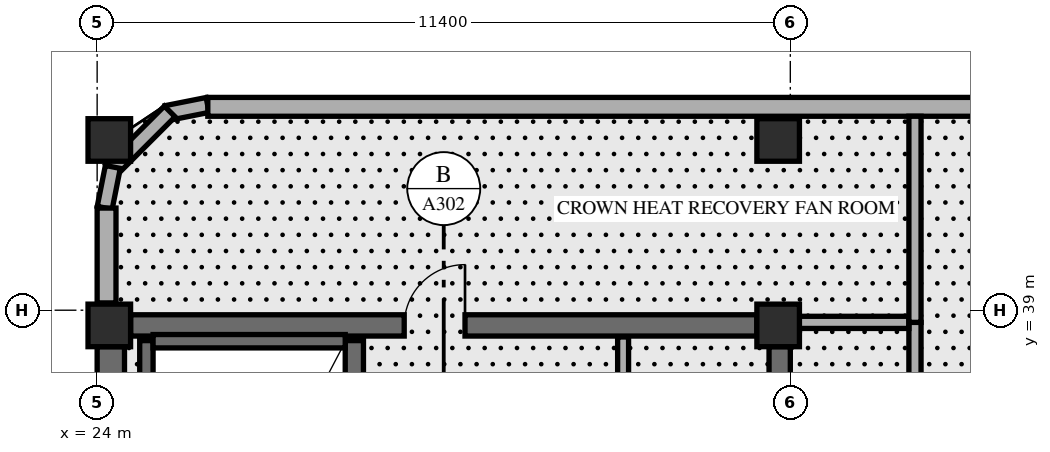
"""IFC4 building model, lengths in metres.
Left out: names, types, materials, properties, quantities, classifications, styles, units other than length and angle.
Written with IfcOpenShell. Run it as: python <this file> out.ifc"""

import sys

from ifc_helpers import new_model, si_unit, direction, frame, frame_2d, origin, origin_2d, place, context, subcontext, project, spatial, rectangle, extrude, element, fill, save


model = new_model("IFC4")
c1 = context("Model", 3, precision=1e-05, world=origin(), true_north=direction((0.0, 1.0)))
c2 = subcontext(c1, "Body", "Model", "MODEL_VIEW")
j1 = project(units=[si_unit("LENGTHUNIT", "METRE"), si_unit("PLANEANGLEUNIT", "RADIAN")], contexts=[c1])
p1 = place(None, origin())
s1 = spatial("IfcSite", under=j1, at=p1, CompositionType="ELEMENT")
p2 = place(p1, origin())
s2 = spatial("IfcBuilding", under=s1, at=p2, CompositionType="ELEMENT")
p3 = place(p2, frame((0.0, 0.0, 287.0)))
s3 = spatial("IfcBuildingStorey", under=s2, at=p3, CompositionType="ELEMENT", Elevation=287.0)
p4 = place(p3, frame((24.225, 30.55, 0.0), z_axis=(0.0, 0.0, 1.0), x_axis=(0.0, 1.0, 0.0)))
e1 = element("IfcWall", 1, at=p4, inside=s3, PredefinedType="SHEAR", context=c2, shape_type="SweptSolid", body=[
    extrude(rectangle(XDim=7.85, YDim=0.45, at=frame_2d((3.925, 0.0))), origin(), (0.0, 0.0, 1.0), 5.161),
])
p5 = place(p3, frame((35.225, 31.35, 0.0), z_axis=(0.0, 0.0, 1.0), x_axis=(0.0, 1.0, 0.0)))
e2 = element("IfcWall", 2, at=p5, inside=s3, PredefinedType="SHEAR", context=c2, shape_type="SweptSolid", body=[
    extrude(rectangle(XDim=7.05, YDim=0.35, at=frame_2d((3.525, 0.0))), origin(), (0.0, 0.0, 1.0), 5.161),
])
p6 = place(p3, frame((24.55, 38.75, 0.0), z_axis=(0.0, 0.0, 1.0), x_axis=(1.0, 0.0, 0.0)))
e3 = element("IfcWall", 3, at=p6, inside=s3, PredefinedType="SHEAR", context=c2, shape_type="SweptSolid", body=[
    extrude(rectangle(XDim=10.3, YDim=0.35, at=frame_2d((5.15, 0.0))), origin(), (0.0, 0.0, 1.0), 5.7),
])
p7 = place(p6, frame((4.5, 0.0, 0.0)))
e4 = element("IfcOpeningElement", 4, at=p7, cuts=e3, PredefinedType="OPENING", context=c2, shape_type="SweptSolid", body=[
    extrude(rectangle(XDim=1.0, YDim=2.15, at=frame_2d((0.5, 1.075))), frame((0.0, 0.185, 0.0), z_axis=(0.0, -1.0, 0.0), x_axis=(1.0, 0.0, 0.0)), (0.0, 0.0, 1.0), 0.37),
])
p8 = place(p3, frame((24.81, 30.74, 0.0), z_axis=(0.0, 0.0, 1.0), x_axis=(0.0, 1.0, 0.0)))
e5 = element("IfcWall", 5, at=p8, inside=s3, PredefinedType="SHEAR", context=c2, shape_type="SweptSolid", body=[
    extrude(rectangle(XDim=7.76, YDim=0.22, at=frame_2d((3.88, 0.0))), origin(), (0.0, 0.0, 1.0), 5.7),
])
p9 = place(p3, frame((28.23, 30.74, 0.0), z_axis=(0.0, 0.0, 1.0), x_axis=(0.0, 1.0, 0.0)))
e6 = element("IfcWall", 6, at=p9, inside=s3, PredefinedType="SHEAR", context=c2, shape_type="SweptSolid", body=[
    extrude(rectangle(XDim=7.76, YDim=0.3, at=frame_2d((3.88, 0.0))), origin(), (0.0, 0.0, 1.0), 5.7),
])
p10 = place(p3, frame((24.92, 38.49, 0.0), z_axis=(0.0, 0.0, 1.0), x_axis=(1.0, 0.0, 0.0)))
e7 = element("IfcWall", 7, at=p10, inside=s3, PredefinedType="SHEAR", context=c2, shape_type="SweptSolid", body=[
    extrude(rectangle(XDim=3.16, YDim=0.22, at=frame_2d((1.58, 0.0))), origin(), (0.0, 0.0, 1.0), 5.7),
])
for number, where, z_axis, x_axis in (
    (8, (24.2, 38.75, 0.0), (0.0, 0.0, 1.0), (1.0, 0.0, 0.0)),
    (9, (24.2, 41.8, 0.0), (0.0, 0.0, 1.0), (1.0, 0.0, 0.0)),
    (10, (35.2, 38.75, 0.0), (0.0, 0.0, 1.0), (1.0, 0.0, 0.0)),
    (11, (35.2, 41.8, 0.0), (0.0, 0.0, 1.0), (1.0, 0.0, 0.0)),
):
    element("IfcColumn", number, at=place(p3, frame(where, z_axis=z_axis, x_axis=x_axis)), inside=s3, PredefinedType="COLUMN", context=c2, shape_type="SweptSolid", body=[
        extrude(rectangle(XDim=0.7, YDim=0.7, at=origin_2d()), origin(), (0.0, 0.0, 1.0), 5.996),
    ])
p11 = place(p3, frame((25.816, 42.376, 0.0), z_axis=(0.0, 0.0, 1.0), x_axis=(-0.980812594069, -0.194952956674, 0.0)))
e12 = element("IfcWall", 12, at=p11, inside=s3, PredefinedType="SOLIDWALL", context=c2, shape_type="SweptSolid", body=[
    extrude(rectangle(XDim=0.686, YDim=0.25, at=frame_2d((0.343, 0.0))), origin(), (0.0, 0.0, 1.0), 5.7),
])
p12 = place(p3, frame((25.194, 42.269, 0.0), z_axis=(0.0, 0.0, 1.0), x_axis=(-0.707106781187, -0.707106781187, 0.0)))
e13 = element("IfcWall", 13, at=p12, inside=s3, PredefinedType="SOLIDWALL", context=c2, shape_type="SweptSolid", body=[
    extrude(rectangle(XDim=1.362, YDim=0.25, at=frame_2d((0.681, 0.0))), origin(), (0.0, 0.0, 1.0), 5.143),
])
p13 = place(p3, frame((24.258, 41.357, 0.0), z_axis=(0.0, 0.0, 1.0), x_axis=(-0.194952956674, -0.980812594069, 0.0)))
e14 = element("IfcWall", 14, at=p13, inside=s3, PredefinedType="SOLIDWALL", context=c2, shape_type="SweptSolid", body=[
    extrude(rectangle(XDim=0.686, YDim=0.25, at=frame_2d((0.343, 0.0))), origin(), (0.0, 0.0, 1.0), 5.143),
])
p14 = place(p3, frame((58.78, 42.345, 0.0), z_axis=(0.0, 0.0, 1.0), x_axis=(-1.0, 0.0, 0.0)))
e15 = element("IfcWall", 15, at=p14, inside=s3, PredefinedType="SOLIDWALL", context=c2, shape_type="SweptSolid", body=[
    extrude(rectangle(XDim=32.96, YDim=0.31, at=frame_2d((16.48, 0.0))), origin(), (0.0, 0.0, 1.0), 5.7),
])
p15 = place(p3, frame((24.155, 39.12, 0.0), z_axis=(0.0, 0.0, 1.0), x_axis=(0.0, 1.0, 0.0)))
e16 = element("IfcWall", 16, at=p15, inside=s3, PredefinedType="SOLIDWALL", context=c2, shape_type="SweptSolid", body=[
    extrude(rectangle(XDim=1.56, YDim=0.31, at=frame_2d((0.78, 0.0))), origin(), (0.0, 0.0, 1.0), 5.143),
])
p16 = place(p3, frame((32.65, 31.35, 0.0), z_axis=(0.0, 0.0, 1.0), x_axis=(0.0, 1.0, 0.0)))
e17 = element("IfcWall", 17, at=p16, inside=s3, PredefinedType="STANDARD", context=c2, shape_type="SweptSolid", body=[
    extrude(rectangle(XDim=7.21, YDim=0.18, at=frame_2d((3.605, 0.0))), origin(), (0.0, 0.0, 1.0), 5.7),
])
p17 = place(p16, frame((0.58, 0.0, 0.0)))
e18 = element("IfcOpeningElement", 18, at=p17, cuts=e17, PredefinedType="OPENING", context=c2, shape_type="SweptSolid", body=[
    extrude(rectangle(XDim=0.9, YDim=2.1, at=frame_2d((0.45, 1.05))), frame((0.0, 0.1, 0.0), z_axis=(0.0, -1.0, 0.0), x_axis=(1.0, 0.0, 0.0)), (0.0, 0.0, 1.0), 0.2),
])
p18 = place(p16, frame((2.73, 0.0, 0.0)))
e19 = element("IfcOpeningElement", 19, at=p18, cuts=e17, PredefinedType="OPENING", context=c2, shape_type="SweptSolid", body=[
    extrude(rectangle(XDim=0.9, YDim=2.1, at=frame_2d((0.45, 1.05))), frame((0.0, 0.1, 0.0), z_axis=(0.0, -1.0, 0.0), x_axis=(1.0, 0.0, 0.0)), (0.0, 0.0, 1.0), 0.2),
])
p19 = place(p16, frame((4.88, 0.0, 0.0)))
e20 = element("IfcOpeningElement", 20, at=p19, cuts=e17, PredefinedType="OPENING", context=c2, shape_type="SweptSolid", body=[
    extrude(rectangle(XDim=0.9, YDim=2.1, at=frame_2d((0.45, 1.05))), frame((0.0, 0.1, 0.0), z_axis=(0.0, -1.0, 0.0), x_axis=(1.0, 0.0, 0.0)), (0.0, 0.0, 1.0), 0.2),
])
p20 = place(p3, frame((37.45, 13.8, 0.0), z_axis=(0.0, 0.0, 1.0), x_axis=(0.0, 1.0, 0.0)))
e21 = element("IfcWall", 21, at=p20, inside=s3, PredefinedType="STANDARD", context=c2, shape_type="SweptSolid", body=[
    extrude(rectangle(XDim=25.0, YDim=0.2, at=frame_2d((12.5, 0.0))), origin(), (0.0, 0.0, 1.0), 5.143),
])
p21 = place(p20, frame((6.6, 0.0, 0.0)))
e22 = element("IfcOpeningElement", 22, at=p21, cuts=e21, PredefinedType="OPENING", context=c2, shape_type="SweptSolid", body=[
    extrude(rectangle(XDim=1.05, YDim=2.15, at=frame_2d((0.525, 1.075))), frame((0.0, 0.11, 0.0), z_axis=(0.0, -1.0, 0.0), x_axis=(1.0, 0.0, 0.0)), (0.0, 0.0, 1.0), 0.22),
])
p22 = place(p20, frame((0.6, 0.0, 0.0)))
e23 = element("IfcOpeningElement", 23, at=p22, cuts=e21, PredefinedType="OPENING", context=c2, shape_type="SweptSolid", body=[
    extrude(rectangle(XDim=1.0, YDim=2.15, at=frame_2d((0.5, 1.075))), frame((0.0, 0.11, 0.0), z_axis=(0.0, -1.0, 0.0), x_axis=(1.0, 0.0, 0.0)), (0.0, 0.0, 1.0), 0.22),
])
p23 = place(p20, frame((11.6, 0.0, 0.0)))
e24 = element("IfcOpeningElement", 24, at=p23, cuts=e21, PredefinedType="OPENING", context=c2, shape_type="SweptSolid", body=[
    extrude(rectangle(XDim=1.05, YDim=2.15, at=frame_2d((0.525, 1.075))), frame((0.0, 0.11, 0.0), z_axis=(0.0, -1.0, 0.0), x_axis=(1.0, 0.0, 0.0)), (0.0, 0.0, 1.0), 0.22),
])
p24 = place(p20, frame((18.1, 0.0, 0.0)))
e25 = element("IfcOpeningElement", 25, at=p24, cuts=e21, PredefinedType="OPENING", context=c2, shape_type="SweptSolid", body=[
    extrude(rectangle(XDim=1.05, YDim=2.15, at=frame_2d((0.525, 1.075))), frame((0.0, 0.11, 0.0), z_axis=(0.0, -1.0, 0.0), x_axis=(1.0, 0.0, 0.0)), (0.0, 0.0, 1.0), 0.22),
])
p25 = place(p20, frame((22.0, 0.0, 0.0)))
e26 = element("IfcOpeningElement", 26, at=p25, cuts=e21, PredefinedType="OPENING", context=c2, shape_type="SweptSolid", body=[
    extrude(rectangle(XDim=1.05, YDim=2.15, at=frame_2d((0.525, 1.075))), frame((0.0, 0.11, 0.0), z_axis=(0.0, -1.0, 0.0), x_axis=(1.0, 0.0, 0.0)), (0.0, 0.0, 1.0), 0.22),
])
p26 = place(p3, frame((35.42, 38.8, 0.0), z_axis=(0.0, 0.0, 1.0), x_axis=(1.0, 0.0, 0.0)))
e27 = element("IfcWall", 27, at=p26, inside=s3, PredefinedType="STANDARD", context=c2, shape_type="SweptSolid", body=[
    extrude(rectangle(XDim=1.93, YDim=0.2, at=frame_2d((0.965, 0.0))), origin(), (0.0, 0.0, 1.0), 5.143),
])
p27 = place(p3, frame((37.45, 38.8, 0.0), z_axis=(0.0, 0.0, 1.0), x_axis=(0.0, 1.0, 0.0)))
e28 = element("IfcWall", 28, at=p27, inside=s3, PredefinedType="STANDARD", context=c2, shape_type="SweptSolid", body=[
    extrude(rectangle(XDim=3.39, YDim=0.2, at=frame_2d((1.695, 0.0))), origin(), (0.0, 0.0, 1.0), 5.143),
])
p28 = place(p7, origin())
e29 = element("IfcDoor", 29, at=p28, inside=s3, OperationType="SINGLE_SWING_RIGHT", PredefinedType="DOOR", context=c2, shape_type="SweptSolid", body=[
    extrude(rectangle(XDim=1.0, YDim=2.15, at=frame_2d((0.5, 1.075))), frame((0.0, 0.025, 0.0), z_axis=(0.0, -1.0, 0.0), x_axis=(1.0, 0.0, 0.0)), (0.0, 0.0, 1.0), 0.05),
])
fill(e4, e29)
save(model, sys.argv[1])
